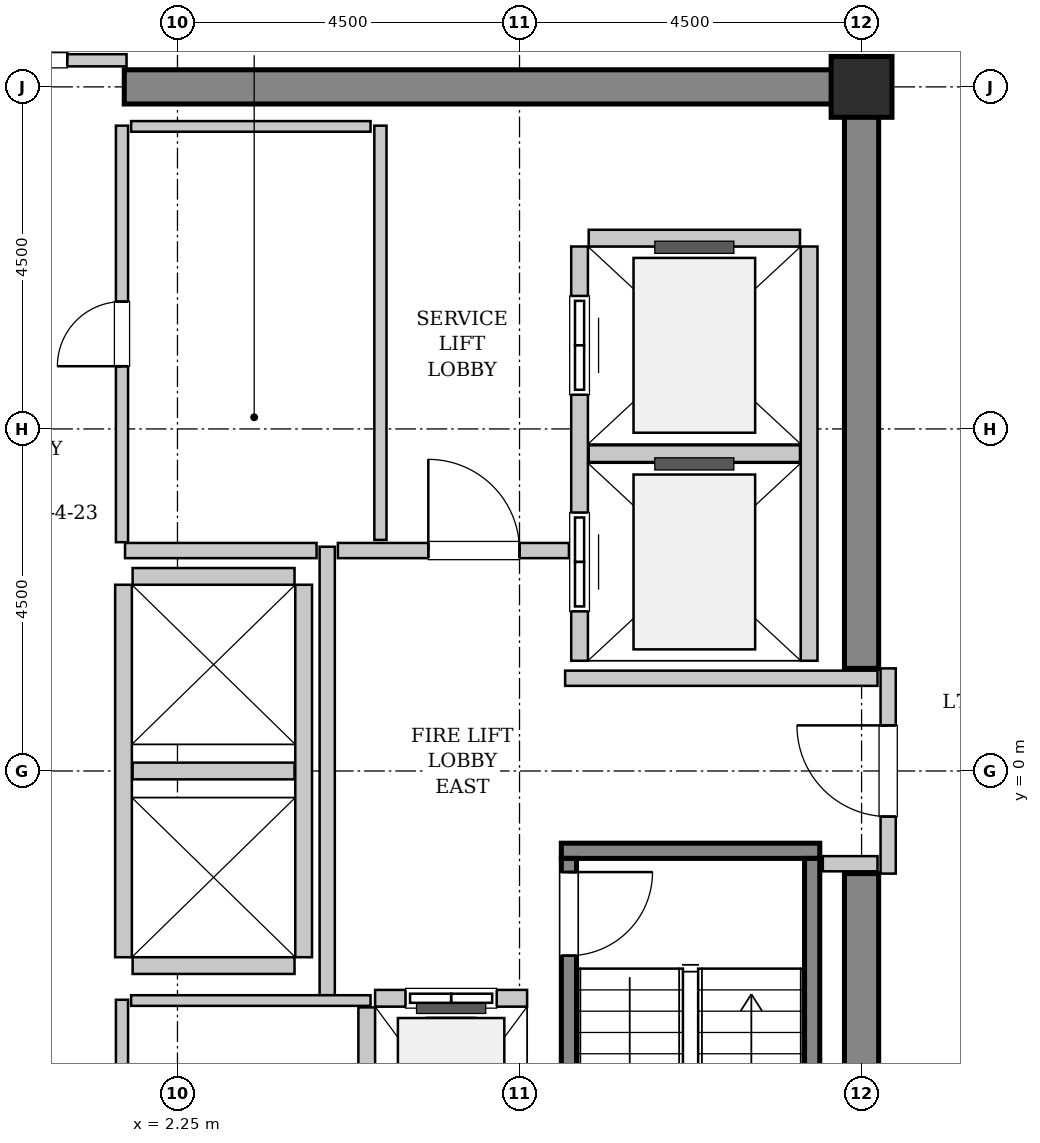
"""IFC4 building model, lengths in metres.
Left out: names, types, materials, properties, quantities, classifications, styles, units other than length and angle.
Written with IfcOpenShell. Run it as: python <this file> out.ifc"""

import sys

from ifc_helpers import new_model, si_unit, direction, frame, frame_2d, origin, origin_2d, place, context, subcontext, project, spatial, rectangle, hollow_rectangle, extrude, source, transform, mapped, element, fill, save


model = new_model("IFC4")
c1 = context("Model", 3, precision=1e-05, world=origin(), true_north=direction((0.0, 1.0)))
c2 = subcontext(c1, "Body", "Model", "MODEL_VIEW")
j1 = project(units=[si_unit("LENGTHUNIT", "METRE"), si_unit("PLANEANGLEUNIT", "RADIAN")], contexts=[c1])
p1 = place(None, origin())
s1 = spatial("IfcSite", under=j1, at=p1, CompositionType="ELEMENT")
p2 = place(p1, origin())
s2 = spatial("IfcBuilding", under=s1, at=p2, CompositionType="ELEMENT")
p3 = place(p2, frame((0.0, 0.0, 287.4)))
s3 = spatial("IfcBuildingStorey", under=s2, at=p3, CompositionType="ELEMENT", Elevation=287.4)
m1 = source(origin(), c2, "Body", "SweptSolid", [
    extrude(rectangle(XDim=9.925, YDim=0.45, at=frame_2d((4.962, 0.0))), origin(), (0.0, 0.0, 1.0), 3.8),
])
p4 = place(p3, frame((1.55, 9.0, 0.0), z_axis=(0.0, 0.0, 1.0), x_axis=(1.0, 0.0, 0.0)))
e1 = element("IfcWall", 1, at=p4, inside=s3, PredefinedType="SHEAR", context=c2, shape_type="MappedRepresentation", body=[
    mapped(m1, transform((0.0, 0.0, 0.0), x_axis=(1.0, 0.0, 0.0), y_axis=(0.0, 1.0, 0.0), z_axis=(0.0, 0.0, 1.0), scale=1.0)),
])
m2 = source(origin(), c2, "Body", "SweptSolid", [
    extrude(rectangle(XDim=7.425, YDim=0.45, at=frame_2d((3.712, 0.0))), origin(), (0.0, 0.0, 1.0), 3.8),
])
for number, where, z_axis, x_axis in (
    (2, (11.25, -8.775, 0.0), (0.0, 0.0, 1.0), (0.0, 1.0, 0.0)),
    (3, (11.25, 1.35, 0.0), (0.0, 0.0, 1.0), (0.0, 1.0, 0.0)),
):
    element("IfcWall", number, at=place(p3, frame(where, z_axis=z_axis, x_axis=x_axis)), inside=s3, PredefinedType="SHEAR", context=c2, shape_type="MappedRepresentation", body=[
        mapped(m2, transform((0.0, 0.0, 0.0), x_axis=(1.0, 0.0, 0.0), y_axis=(0.0, 1.0, 0.0), z_axis=(0.0, 0.0, 1.0), scale=1.0)),
    ])
m3 = source(origin(), c2, "Body", "SweptSolid", [
    extrude(hollow_rectangle(XDim=0.8, YDim=0.8, WallThickness=0.04, InnerFilletRadius=0.04, OuterFilletRadius=0.08, at=origin_2d()), origin(), (0.0, 0.0, 1.0), 3.8),
])
p5 = place(p3, frame((11.25, 9.0, 0.0), z_axis=(0.0, 0.0, 1.0), x_axis=(1.0, 0.0, 0.0)))
e4 = element("IfcColumn", 4, at=p5, inside=s3, PredefinedType="COLUMN", context=c2, shape_type="MappedRepresentation", body=[
    mapped(m3, transform((0.0, 0.0, 0.0), x_axis=(1.0, 0.0, 0.0), y_axis=(0.0, 1.0, 0.0), z_axis=(0.0, 0.0, 1.0), scale=1.0)),
])
m4 = source(origin(), c2, "Body", "SweptSolid", [
    extrude(rectangle(XDim=3.4, YDim=0.2, at=frame_2d((1.7, 0.0))), origin(), (0.0, 0.0, 1.0), 3.8),
])
p6 = place(p3, frame((7.3, -1.05, 0.0), z_axis=(0.0, 0.0, 1.0), x_axis=(1.0, 0.0, 0.0)))
e5 = element("IfcWall", 5, at=p6, inside=s3, PredefinedType="SOLIDWALL", context=c2, shape_type="MappedRepresentation", body=[
    mapped(m4, transform((0.0, 0.0, 0.0), x_axis=(1.0, 0.0, 0.0), y_axis=(0.0, 1.0, 0.0), z_axis=(0.0, 0.0, 1.0), scale=1.0)),
])
m5 = source(origin(), c2, "Body", "SweptSolid", [
    extrude(rectangle(XDim=7.1, YDim=0.2, at=frame_2d((3.55, 0.0))), origin(), (0.0, 0.0, 1.0), 3.8),
])
p7 = place(p3, frame((7.4, -1.15, 0.0), z_axis=(0.0, 0.0, 1.0), x_axis=(0.0, -1.0, 0.0)))
e6 = element("IfcWall", 6, at=p7, inside=s3, PredefinedType="SOLIDWALL", context=c2, shape_type="MappedRepresentation", body=[
    mapped(m5, transform((0.0, 0.0, 0.0), x_axis=(1.0, 0.0, 0.0), y_axis=(0.0, 1.0, 0.0), z_axis=(0.0, 0.0, 1.0), scale=1.0)),
])
p8 = place(p7, frame((0.18, 0.0, 0.0)))
e7 = element("IfcOpeningElement", 7, at=p8, cuts=e6, PredefinedType="OPENING", context=c2, shape_type="SweptSolid", body=[
    extrude(rectangle(XDim=1.1, YDim=2.15, at=frame_2d((0.55, 1.075))), frame((0.0, 0.11, 0.0), z_axis=(0.0, -1.0, 0.0), x_axis=(1.0, 0.0, 0.0)), (0.0, 0.0, 1.0), 0.22),
])
p9 = place(p3, frame((10.6, -1.15, 0.0), z_axis=(0.0, 0.0, 1.0), x_axis=(0.0, -1.0, 0.0)))
e8 = element("IfcWall", 8, at=p9, inside=s3, PredefinedType="SOLIDWALL", context=c2, shape_type="MappedRepresentation", body=[
    mapped(m5, transform((0.0, 0.0, 0.0), x_axis=(1.0, 0.0, 0.0), y_axis=(0.0, 1.0, 0.0), z_axis=(0.0, 0.0, 1.0), scale=1.0)),
])
m6 = source(origin(), c2, "Body", "SweptSolid", [
    extrude(rectangle(XDim=2.0, YDim=0.22, at=frame_2d((1.0, 0.0))), origin(), (0.0, 0.0, 1.0), 3.535),
])
p10 = place(p3, frame((6.85, -2.99, 0.0), z_axis=(0.0, 0.0, 1.0), x_axis=(-1.0, 0.0, 0.0)))
e9 = element("IfcWall", 9, at=p10, inside=s3, PredefinedType="SOLIDWALL", context=c2, shape_type="MappedRepresentation", body=[
    mapped(m6, transform((0.0, 0.0, 0.0), x_axis=(1.0, 0.0, 0.0), y_axis=(0.0, 1.0, 0.0), z_axis=(0.0, 0.0, 1.0), scale=1.0)),
])
p11 = place(p10, frame((0.4, 0.0, 0.0)))
e10 = element("IfcOpeningElement", 10, at=p11, cuts=e9, PredefinedType="OPENING", context=c2, shape_type="SweptSolid", body=[
    extrude(rectangle(XDim=1.2, YDim=2.2, at=frame_2d((0.6, 1.1))), frame((0.0, 0.12, 0.0), z_axis=(0.0, -1.0, 0.0), x_axis=(1.0, 0.0, 0.0)), (0.0, 0.0, 1.0), 0.24),
])
m7 = source(origin(), c2, "Body", "SweptSolid", [
    extrude(rectangle(XDim=2.68, YDim=0.22, at=frame_2d((1.34, 0.0))), origin(), (0.0, 0.0, 1.0), 3.535),
])
p12 = place(p3, frame((4.74, -3.11, 0.0), z_axis=(0.0, 0.0, 1.0), x_axis=(0.0, -1.0, 0.0)))
e11 = element("IfcWall", 11, at=p12, inside=s3, PredefinedType="SOLIDWALL", context=c2, shape_type="MappedRepresentation", body=[
    mapped(m7, transform((0.0, 0.0, 0.0), x_axis=(1.0, 0.0, 0.0), y_axis=(0.0, 1.0, 0.0), z_axis=(0.0, 0.0, 1.0), scale=1.0)),
])
m8 = source(origin(), c2, "Body", "SweptSolid", [
    extrude(rectangle(XDim=5.45, YDim=0.22, at=frame_2d((2.725, 0.0))), origin(), (0.0, 0.0, 1.0), 3.535),
])
p13 = place(p3, frame((7.54, 6.9, 0.0), z_axis=(0.0, 0.0, 1.0), x_axis=(0.0, -1.0, 0.0)))
e12 = element("IfcWall", 12, at=p13, inside=s3, PredefinedType="SOLIDWALL", context=c2, shape_type="MappedRepresentation", body=[
    mapped(m8, transform((0.0, 0.0, 0.0), x_axis=(1.0, 0.0, 0.0), y_axis=(0.0, 1.0, 0.0), z_axis=(0.0, 0.0, 1.0), scale=1.0)),
])
p14 = place(p13, frame((3.5, 0.0, 0.0)))
e13 = element("IfcOpeningElement", 13, at=p14, cuts=e12, PredefinedType="OPENING", context=c2, shape_type="SweptSolid", body=[
    extrude(rectangle(XDim=1.3, YDim=2.3, at=frame_2d((0.65, 1.15))), frame((0.0, 0.12, 0.0), z_axis=(0.0, -1.0, 0.0), x_axis=(1.0, 0.0, 0.0)), (0.0, 0.0, 1.0), 0.24),
])
p15 = place(p13, frame((0.65, 0.0, 0.0)))
e14 = element("IfcOpeningElement", 14, at=p15, cuts=e12, PredefinedType="OPENING", context=c2, shape_type="SweptSolid", body=[
    extrude(rectangle(XDim=1.3, YDim=2.3, at=frame_2d((0.65, 1.15))), frame((0.0, 0.12, 0.0), z_axis=(0.0, -1.0, 0.0), x_axis=(1.0, 0.0, 0.0)), (0.0, 0.0, 1.0), 0.24),
])
p16 = place(p3, frame((10.56, 1.45, 0.0), z_axis=(0.0, 0.0, 1.0), x_axis=(0.0, 1.0, 0.0)))
e15 = element("IfcWall", 15, at=p16, inside=s3, PredefinedType="SOLIDWALL", context=c2, shape_type="MappedRepresentation", body=[
    mapped(m8, transform((0.0, 0.0, 0.0), x_axis=(1.0, 0.0, 0.0), y_axis=(0.0, 1.0, 0.0), z_axis=(0.0, 0.0, 1.0), scale=1.0)),
])
m9 = source(origin(), c2, "Body", "SweptSolid", [
    extrude(rectangle(XDim=2.78, YDim=0.22, at=frame_2d((1.39, 0.0))), origin(), (0.0, 0.0, 1.0), 3.535),
])
for number, where, z_axis, x_axis in (
    (16, (7.66, 4.175, 0.0), (0.0, 0.0, 1.0), (1.0, 0.0, 0.0)),
    (17, (10.44, 7.01, 0.0), (0.0, 0.0, 1.0), (-1.0, 0.0, 0.0)),
):
    element("IfcWall", number, at=place(p3, frame(where, z_axis=z_axis, x_axis=x_axis)), inside=s3, PredefinedType="SOLIDWALL", context=c2, shape_type="MappedRepresentation", body=[
        mapped(m9, transform((0.0, 0.0, 0.0), x_axis=(1.0, 0.0, 0.0), y_axis=(0.0, 1.0, 0.0), z_axis=(0.0, 0.0, 1.0), scale=1.0)),
    ])
m10 = source(origin(), c2, "Body", "SweptSolid", [
    extrude(rectangle(XDim=4.9, YDim=0.22, at=frame_2d((2.45, 0.0))), origin(), (0.0, 0.0, 1.0), 3.535),
])
for number, where, z_axis, x_axis in (
    (18, (1.54, 2.45, 0.0), (0.0, 0.0, 1.0), (0.0, -1.0, 0.0)),
    (19, (3.91, -2.45, 0.0), (0.0, 0.0, 1.0), (0.0, 1.0, 0.0)),
):
    element("IfcWall", number, at=place(p3, frame(where, z_axis=z_axis, x_axis=x_axis)), inside=s3, PredefinedType="SOLIDWALL", context=c2, shape_type="MappedRepresentation", body=[
        mapped(m10, transform((0.0, 0.0, 0.0), x_axis=(1.0, 0.0, 0.0), y_axis=(0.0, 1.0, 0.0), z_axis=(0.0, 0.0, 1.0), scale=1.0)),
    ])
m11 = source(origin(), c2, "Body", "SweptSolid", [
    extrude(rectangle(XDim=2.13, YDim=0.22, at=frame_2d((1.065, 0.0))), origin(), (0.0, 0.0, 1.0), 3.535),
])
for number, where, z_axis, x_axis in (
    (20, (1.66, -2.56, 0.0), (0.0, 0.0, 1.0), (1.0, 0.0, 0.0)),
    (21, (1.66, 0.0, 0.0), (0.0, 0.0, 1.0), (1.0, 0.0, 0.0)),
    (22, (3.79, 2.56, 0.0), (0.0, 0.0, 1.0), (-1.0, 0.0, 0.0)),
):
    element("IfcWall", number, at=place(p3, frame(where, z_axis=z_axis, x_axis=x_axis)), inside=s3, PredefinedType="SOLIDWALL", context=c2, shape_type="MappedRepresentation", body=[
        mapped(m11, transform((0.0, 0.0, 0.0), x_axis=(1.0, 0.0, 0.0), y_axis=(0.0, 1.0, 0.0), z_axis=(0.0, 0.0, 1.0), scale=1.0)),
    ])
m12 = source(origin(), c2, "Body", "SweptSolid", [
    extrude(rectangle(XDim=2.7, YDim=0.2, at=frame_2d((1.35, 0.0))), origin(), (0.0, 0.0, 1.0), 2.625),
])
p17 = place(p3, frame((11.6, -1.35, 0.0), z_axis=(0.0, 0.0, 1.0), x_axis=(0.0, 1.0, 0.0)))
e23 = element("IfcWall", 23, at=p17, inside=s3, PredefinedType="PARTITIONING", context=c2, shape_type="MappedRepresentation", body=[
    mapped(m12, transform((0.0, 0.0, 0.0), x_axis=(1.0, 0.0, 0.0), y_axis=(0.0, 1.0, 0.0), z_axis=(0.0, 0.0, 1.0), scale=1.0)),
])
p18 = place(p17, frame((0.75, 0.0, 0.0)))
e24 = element("IfcOpeningElement", 24, at=p18, cuts=e23, PredefinedType="OPENING", context=c2, shape_type="SweptSolid", body=[
    extrude(rectangle(XDim=1.2, YDim=2.15, at=frame_2d((0.6, 1.075))), frame((0.0, 0.11, 0.0), z_axis=(0.0, -1.0, 0.0), x_axis=(1.0, 0.0, 0.0)), (0.0, 0.0, 1.0), 0.22),
])
m13 = source(origin(), c2, "Body", "SweptSolid", [
    extrude(rectangle(XDim=5.9, YDim=0.2, at=frame_2d((2.95, 0.0))), origin(), (0.0, 0.0, 1.0), 3.535),
])
p19 = place(p3, frame((4.22, -2.95, 0.0), z_axis=(0.0, 0.0, 1.0), x_axis=(0.0, 1.0, 0.0)))
e25 = element("IfcWall", 25, at=p19, inside=s3, PredefinedType="PARTITIONING", context=c2, shape_type="MappedRepresentation", body=[
    mapped(m13, transform((0.0, 0.0, 0.0), x_axis=(1.0, 0.0, 0.0), y_axis=(0.0, 1.0, 0.0), z_axis=(0.0, 0.0, 1.0), scale=1.0)),
])
m14 = source(origin(), c2, "Body", "SweptSolid", [
    extrude(rectangle(XDim=2.52, YDim=0.2, at=frame_2d((1.26, 0.0))), origin(), (0.0, 0.0, 1.0), 3.535),
])
p20 = place(p3, frame((1.56, 2.9, 0.0), z_axis=(0.0, 0.0, 1.0), x_axis=(1.0, 0.0, 0.0)))
e26 = element("IfcWall", 26, at=p20, inside=s3, PredefinedType="PARTITIONING", context=c2, shape_type="MappedRepresentation", body=[
    mapped(m14, transform((0.0, 0.0, 0.0), x_axis=(1.0, 0.0, 0.0), y_axis=(0.0, 1.0, 0.0), z_axis=(0.0, 0.0, 1.0), scale=1.0)),
])
m15 = source(origin(), c2, "Body", "SweptSolid", [
    extrude(rectangle(XDim=3.04, YDim=0.2, at=frame_2d((1.52, 0.0))), origin(), (0.0, 0.0, 1.0), 3.535),
])
p21 = place(p3, frame((4.36, 2.9, 0.0), z_axis=(0.0, 0.0, 1.0), x_axis=(1.0, 0.0, 0.0)))
e27 = element("IfcWall", 27, at=p21, inside=s3, PredefinedType="PARTITIONING", context=c2, shape_type="MappedRepresentation", body=[
    mapped(m15, transform((0.0, 0.0, 0.0), x_axis=(1.0, 0.0, 0.0), y_axis=(0.0, 1.0, 0.0), z_axis=(0.0, 0.0, 1.0), scale=1.0)),
])
p22 = place(p21, frame((1.19, 0.0, 0.0)))
e28 = element("IfcOpeningElement", 28, at=p22, cuts=e27, PredefinedType="OPENING", context=c2, shape_type="SweptSolid", body=[
    extrude(rectangle(XDim=1.2, YDim=2.15, at=frame_2d((0.6, 1.075))), frame((0.0, 0.11, 0.0), z_axis=(0.0, -1.0, 0.0), x_axis=(1.0, 0.0, 0.0)), (0.0, 0.0, 1.0), 0.22),
])
m16 = source(origin(), c2, "Body", "SweptSolid", [
    extrude(rectangle(XDim=4.11, YDim=0.2, at=frame_2d((2.055, 0.0))), origin(), (0.0, 0.0, 1.0), 3.535),
])
p23 = place(p3, frame((7.35, 1.22, 0.0), z_axis=(0.0, 0.0, 1.0), x_axis=(1.0, 0.0, 0.0)))
e29 = element("IfcWall", 29, at=p23, inside=s3, PredefinedType="PARTITIONING", context=c2, shape_type="MappedRepresentation", body=[
    mapped(m16, transform((0.0, 0.0, 0.0), x_axis=(1.0, 0.0, 0.0), y_axis=(0.0, 1.0, 0.0), z_axis=(0.0, 0.0, 1.0), scale=1.0)),
])
m17 = source(origin(), c2, "Body", "SweptSolid", [
    extrude(rectangle(XDim=0.72, YDim=0.2, at=frame_2d((0.36, 0.0))), origin(), (0.0, 0.0, 1.0), 3.535),
])
p24 = place(p3, frame((10.74, -1.22, 0.0), z_axis=(0.0, 0.0, 1.0), x_axis=(1.0, 0.0, 0.0)))
e30 = element("IfcWall", 30, at=p24, inside=s3, PredefinedType="PARTITIONING", context=c2, shape_type="MappedRepresentation", body=[
    mapped(m17, transform((0.0, 0.0, 0.0), x_axis=(1.0, 0.0, 0.0), y_axis=(0.0, 1.0, 0.0), z_axis=(0.0, 0.0, 1.0), scale=1.0)),
])
m18 = source(origin(), c2, "Body", "SweptSolid", [
    extrude(rectangle(XDim=3.16, YDim=0.16, at=frame_2d((1.58, 0.0))), origin(), (0.0, 0.0, 1.0), 2.625),
])
p25 = place(p3, frame((-1.58, 9.35, 0.0), z_axis=(0.0, 0.0, 1.0), x_axis=(1.0, 0.0, 0.0)))
e31 = element("IfcWall", 31, at=p25, inside=s3, PredefinedType="PARTITIONING", context=c2, shape_type="MappedRepresentation", body=[
    mapped(m18, transform((0.0, 0.0, 0.0), x_axis=(1.0, 0.0, 0.0), y_axis=(0.0, 1.0, 0.0), z_axis=(0.0, 0.0, 1.0), scale=1.0)),
])
p26 = place(p25, frame((0.78, 0.0, 0.0)))
e32 = element("IfcOpeningElement", 32, at=p26, cuts=e31, PredefinedType="OPENING", context=c2, shape_type="SweptSolid", body=[
    extrude(rectangle(XDim=1.6, YDim=2.3, at=frame_2d((0.8, 1.15))), frame((0.0, 0.09, 0.0), z_axis=(0.0, -1.0, 0.0), x_axis=(1.0, 0.0, 0.0)), (0.0, 0.0, 1.0), 0.18),
])
m19 = source(origin(), c2, "Body", "SweptSolid", [
    extrude(rectangle(XDim=5.45, YDim=0.16, at=frame_2d((2.725, 0.0))), origin(), (0.0, 0.0, 1.0), 3.535),
])
p27 = place(p3, frame((4.92, 3.04, 0.0), z_axis=(0.0, 0.0, 1.0), x_axis=(0.0, 1.0, 0.0)))
e33 = element("IfcWall", 33, at=p27, inside=s3, PredefinedType="PARTITIONING", context=c2, shape_type="MappedRepresentation", body=[
    mapped(m19, transform((0.0, 0.0, 0.0), x_axis=(1.0, 0.0, 0.0), y_axis=(0.0, 1.0, 0.0), z_axis=(0.0, 0.0, 1.0), scale=1.0)),
])
m20 = source(origin(), c2, "Body", "SweptSolid", [
    extrude(rectangle(XDim=5.48, YDim=0.16, at=frame_2d((2.74, 0.0))), origin(), (0.0, 0.0, 1.0), 3.535),
])
p28 = place(p3, frame((1.52, 3.01, 0.0), z_axis=(0.0, 0.0, 1.0), x_axis=(0.0, 1.0, 0.0)))
e34 = element("IfcWall", 34, at=p28, inside=s3, PredefinedType="PARTITIONING", context=c2, shape_type="MappedRepresentation", body=[
    mapped(m20, transform((0.0, 0.0, 0.0), x_axis=(1.0, 0.0, 0.0), y_axis=(0.0, 1.0, 0.0), z_axis=(0.0, 0.0, 1.0), scale=1.0)),
])
p29 = place(p28, frame((2.315, 0.0, 0.0)))
e35 = element("IfcOpeningElement", 35, at=p29, cuts=e34, PredefinedType="OPENING", context=c2, shape_type="SweptSolid", body=[
    extrude(rectangle(XDim=0.85, YDim=2.1, at=frame_2d((0.425, 1.05))), frame((0.0, 0.09, 0.0), z_axis=(0.0, -1.0, 0.0), x_axis=(1.0, 0.0, 0.0)), (0.0, 0.0, 1.0), 0.18),
])
m21 = source(origin(), c2, "Body", "SweptSolid", [
    extrude(rectangle(XDim=3.15, YDim=0.14, at=frame_2d((1.575, 0.0))), origin(), (0.0, 0.0, 1.0), 3.535),
])
p30 = place(p3, frame((1.64, 8.48, 0.0), z_axis=(0.0, 0.0, 1.0), x_axis=(1.0, 0.0, 0.0)))
e36 = element("IfcWall", 36, at=p30, inside=s3, PredefinedType="PARTITIONING", context=c2, shape_type="MappedRepresentation", body=[
    mapped(m21, transform((0.0, 0.0, 0.0), x_axis=(1.0, 0.0, 0.0), y_axis=(0.0, 1.0, 0.0), z_axis=(0.0, 0.0, 1.0), scale=1.0)),
])
p31 = place(p3, frame((1.52, -8.49, 0.0), z_axis=(0.0, 0.0, 1.0), x_axis=(0.0, 1.0, 0.0)))
e37 = element("IfcWall", 37, at=p31, inside=s3, PredefinedType="PARTITIONING", context=c2, shape_type="MappedRepresentation", body=[
    mapped(m20, transform((0.0, 0.0, 0.0), x_axis=(1.0, 0.0, 0.0), y_axis=(0.0, 1.0, 0.0), z_axis=(0.0, 0.0, 1.0), scale=1.0)),
])
p32 = place(p31, frame((2.315, 0.0, 0.0)))
e38 = element("IfcOpeningElement", 38, at=p32, cuts=e37, PredefinedType="OPENING", context=c2, shape_type="SweptSolid", body=[
    extrude(rectangle(XDim=0.85, YDim=2.1, at=frame_2d((0.425, 1.05))), frame((0.0, 0.09, 0.0), z_axis=(0.0, -1.0, 0.0), x_axis=(1.0, 0.0, 0.0)), (0.0, 0.0, 1.0), 0.18),
])
p33 = place(p3, frame((1.64, -3.02, 0.0), z_axis=(0.0, 0.0, 1.0), x_axis=(1.0, 0.0, 0.0)))
e39 = element("IfcWall", 39, at=p33, inside=s3, PredefinedType="PARTITIONING", context=c2, shape_type="MappedRepresentation", body=[
    mapped(m21, transform((0.0, 0.0, 0.0), x_axis=(1.0, 0.0, 0.0), y_axis=(0.0, 1.0, 0.0), z_axis=(0.0, 0.0, 1.0), scale=1.0)),
])
m22 = source(origin(), c2, "Body", "SweptSolid", [
    extrude(rectangle(XDim=1.1, YDim=2.15, at=frame_2d((0.55, 1.075))), frame((0.0, 0.025, 0.0), z_axis=(0.0, -1.0, 0.0), x_axis=(1.0, 0.0, 0.0)), (0.0, 0.0, 1.0), 0.05),
])
p34 = place(p8, origin())
e40 = element("IfcDoor", 40, at=p34, inside=s3, OperationType="SINGLE_SWING_LEFT", PredefinedType="DOOR", context=c2, shape_type="MappedRepresentation", body=[
    mapped(m22, transform((0.0, 0.0, 0.0), x_axis=(1.0, 0.0, 0.0), y_axis=(0.0, 1.0, 0.0), z_axis=(0.0, 0.0, 1.0), scale=1.0)),
])
fill(e7, e40)
m23 = source(origin(), c2, "Body", "SweptSolid", [
    extrude(rectangle(XDim=1.2, YDim=2.2, at=frame_2d((0.6, 1.1))), frame((0.0, 0.025, 0.0), z_axis=(0.0, -1.0, 0.0), x_axis=(1.0, 0.0, 0.0)), (0.0, 0.0, 1.0), 0.05),
])
p35 = place(p11, origin())
e41 = element("IfcDoor", 41, at=p35, inside=s3, OperationType="SLIDING_TO_LEFT", PredefinedType="DOOR", context=c2, shape_type="MappedRepresentation", body=[
    mapped(m23, transform((0.0, 0.0, 0.0), x_axis=(1.0, 0.0, 0.0), y_axis=(0.0, 1.0, 0.0), z_axis=(0.0, 0.0, 1.0), scale=1.0)),
])
fill(e10, e41)
m24 = source(origin(), c2, "Body", "SweptSolid", [
    extrude(rectangle(XDim=1.3, YDim=2.3, at=frame_2d((0.65, 1.15))), frame((0.0, 0.025, 0.0), z_axis=(0.0, -1.0, 0.0), x_axis=(1.0, 0.0, 0.0)), (0.0, 0.0, 1.0), 0.05),
])
p36 = place(p14, origin())
e42 = element("IfcDoor", 42, at=p36, inside=s3, OperationType="SLIDING_TO_RIGHT", PredefinedType="DOOR", context=c2, shape_type="MappedRepresentation", body=[
    mapped(m24, transform((0.0, 0.0, 0.0), x_axis=(1.0, 0.0, 0.0), y_axis=(0.0, 1.0, 0.0), z_axis=(0.0, 0.0, 1.0), scale=1.0)),
])
fill(e13, e42)
p37 = place(p15, origin())
e43 = element("IfcDoor", 43, at=p37, inside=s3, OperationType="SLIDING_TO_RIGHT", PredefinedType="DOOR", context=c2, shape_type="MappedRepresentation", body=[
    mapped(m24, transform((0.0, 0.0, 0.0), x_axis=(1.0, 0.0, 0.0), y_axis=(0.0, 1.0, 0.0), z_axis=(0.0, 0.0, 1.0), scale=1.0)),
])
fill(e14, e43)
m25 = source(origin(), c2, "Body", "SweptSolid", [
    extrude(rectangle(XDim=1.2, YDim=2.15, at=frame_2d((0.6, 1.075))), frame((0.0, 0.025, 0.0), z_axis=(0.0, -1.0, 0.0), x_axis=(1.0, 0.0, 0.0)), (0.0, 0.0, 1.0), 0.05),
])
p38 = place(p18, origin())
e44 = element("IfcDoor", 44, at=p38, inside=s3, OperationType="SINGLE_SWING_RIGHT", PredefinedType="DOOR", context=c2, shape_type="MappedRepresentation", body=[
    mapped(m25, transform((0.0, 0.0, 0.0), x_axis=(1.0, 0.0, 0.0), y_axis=(0.0, 1.0, 0.0), z_axis=(0.0, 0.0, 1.0), scale=1.0)),
])
fill(e24, e44)
p39 = place(p22, origin())
e45 = element("IfcDoor", 45, at=p39, inside=s3, OperationType="SINGLE_SWING_LEFT", PredefinedType="DOOR", context=c2, shape_type="MappedRepresentation", body=[
    mapped(m25, transform((0.0, 0.0, 0.0), x_axis=(1.0, 0.0, 0.0), y_axis=(0.0, 1.0, 0.0), z_axis=(0.0, 0.0, 1.0), scale=1.0)),
])
fill(e28, e45)
m26 = source(origin(), c2, "Body", "SweptSolid", [
    extrude(rectangle(XDim=1.6, YDim=2.3, at=frame_2d((0.8, 1.15))), frame((0.0, 0.025, 0.0), z_axis=(0.0, -1.0, 0.0), x_axis=(1.0, 0.0, 0.0)), (0.0, 0.0, 1.0), 0.05),
])
p40 = place(p26, origin())
e46 = element("IfcDoor", 46, at=p40, inside=s3, OperationType="DOUBLE_DOOR_SINGLE_SWING", PredefinedType="DOOR", context=c2, shape_type="MappedRepresentation", body=[
    mapped(m26, transform((0.0, 0.0, 0.0), x_axis=(1.0, 0.0, 0.0), y_axis=(0.0, 1.0, 0.0), z_axis=(0.0, 0.0, 1.0), scale=1.0)),
])
fill(e32, e46)
m27 = source(origin(), c2, "Body", "SweptSolid", [
    extrude(rectangle(XDim=0.85, YDim=2.1, at=frame_2d((0.425, 1.05))), frame((0.0, 0.025, 0.0), z_axis=(0.0, -1.0, 0.0), x_axis=(1.0, 0.0, 0.0)), (0.0, 0.0, 1.0), 0.05),
])
p41 = place(p29, origin())
e47 = element("IfcDoor", 47, at=p41, inside=s3, OperationType="SINGLE_SWING_LEFT", PredefinedType="DOOR", context=c2, shape_type="MappedRepresentation", body=[
    mapped(m27, transform((0.0, 0.0, 0.0), x_axis=(1.0, 0.0, 0.0), y_axis=(0.0, 1.0, 0.0), z_axis=(0.0, 0.0, 1.0), scale=1.0)),
])
fill(e35, e47)
save(model, sys.argv[1])
